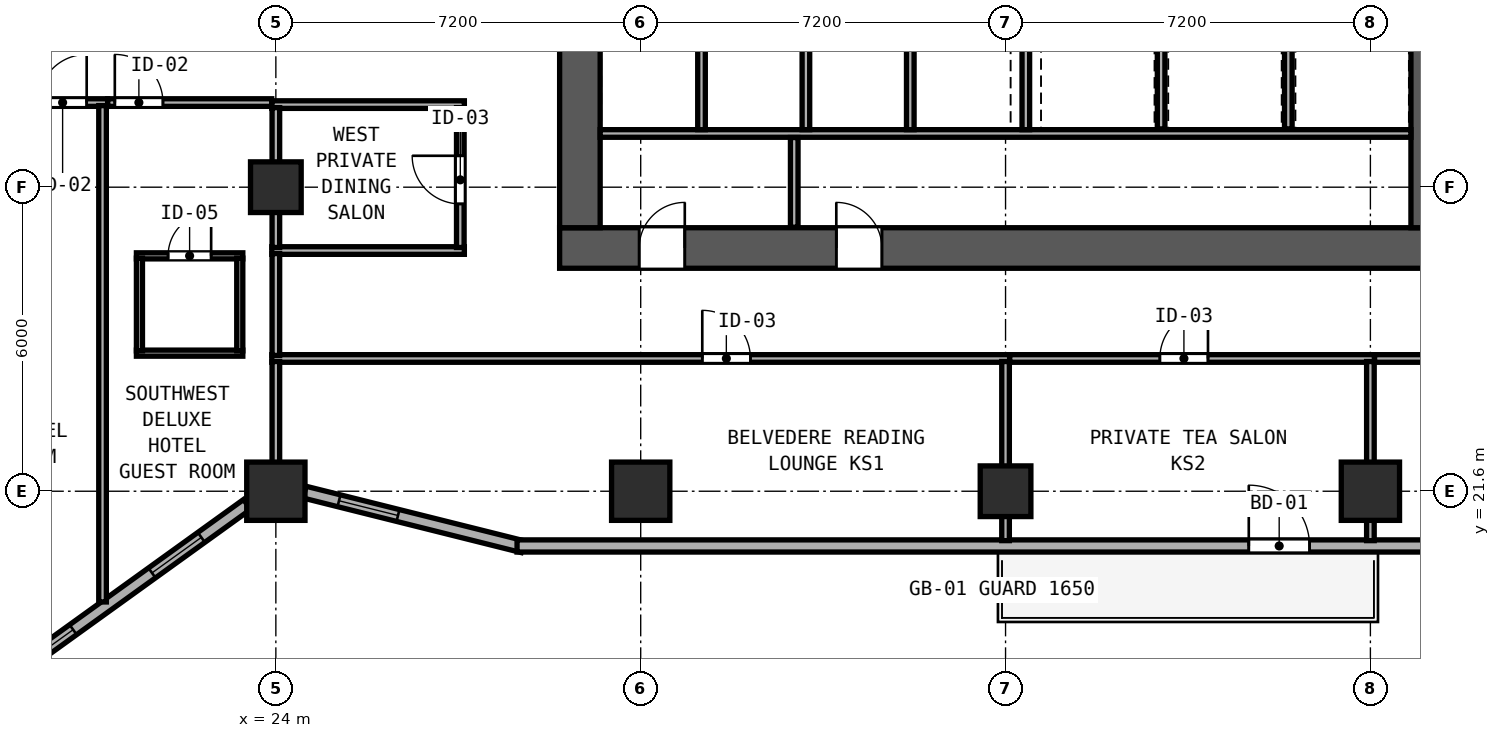
"""IFC4 building model, lengths in metres.
Left out: names, types, materials, properties, quantities, classifications, styles, units other than length and angle.
Written with IfcOpenShell. Run it as: python <this file> out.ifc"""

import sys

from ifc_helpers import new_model, si_unit, direction, frame, frame_2d, origin, origin_2d, place, context, subcontext, project, spatial, rectangle, hollow_rectangle, extrude, element, fill, save


model = new_model("IFC4")
c1 = context("Model", 3, precision=1e-05, world=origin(), true_north=direction((0.0, 1.0)))
c2 = subcontext(c1, "Body", "Model", "MODEL_VIEW")
j1 = project(units=[si_unit("LENGTHUNIT", "METRE"), si_unit("PLANEANGLEUNIT", "RADIAN")], contexts=[c1])
p1 = place(None, origin())
s1 = spatial("IfcSite", under=j1, at=p1, CompositionType="ELEMENT")
p2 = place(p1, origin())
s2 = spatial("IfcBuilding", under=s1, at=p2, CompositionType="ELEMENT")
p3 = place(p2, frame((0.0, 0.0, 59.0)))
s3 = spatial("IfcBuildingStorey", under=s2, at=p3, CompositionType="ELEMENT", Elevation=59.0)
p4 = place(p3, frame((29.6, 26.4, 0.0), z_axis=(0.0, 0.0, 1.0), x_axis=(1.0, 0.0, 0.0)))
e1 = element("IfcWall", 1, at=p4, inside=s3, PredefinedType="SHEAR", context=c2, shape_type="SweptSolid", body=[
    extrude(rectangle(XDim=17.6, YDim=0.8, at=frame_2d((8.8, 0.0))), origin(), (0.0, 0.0, 1.0), 3.6),
])
p5 = place(p4, frame((2.47, 0.0, 0.0), z_axis=(0.0, 0.0, 1.0), x_axis=(-1.0, 0.0, 0.0)))
e2 = element("IfcOpeningElement", 2, at=p5, cuts=e1, PredefinedType="OPENING", context=c2, shape_type="SweptSolid", body=[
    extrude(rectangle(XDim=0.9, YDim=2.1, at=frame_2d((0.45, 1.05))), frame((0.0, 0.41, 0.0), z_axis=(0.0, -1.0, 0.0), x_axis=(1.0, 0.0, 0.0)), (0.0, 0.0, 1.0), 0.82),
])
p6 = place(p4, frame((6.36, 0.0, 0.0), z_axis=(0.0, 0.0, 1.0), x_axis=(-1.0, 0.0, 0.0)))
e3 = element("IfcOpeningElement", 3, at=p6, cuts=e1, PredefinedType="OPENING", context=c2, shape_type="SweptSolid", body=[
    extrude(rectangle(XDim=0.9, YDim=2.1, at=frame_2d((0.45, 1.05))), frame((0.0, 0.41, 0.0), z_axis=(0.0, -1.0, 0.0), x_axis=(1.0, 0.0, 0.0)), (0.0, 0.0, 1.0), 0.82),
])
for number, where, z_axis, x_axis in (
    (4, (30.0, 26.8, 0.0), (0.0, 0.0, 1.0), (0.0, 1.0, 0.0)),
    (5, (46.8, 26.8, 0.0), (0.0, 0.0, 1.0), (0.0, 1.0, 0.0)),
):
    element("IfcWall", number, at=place(p3, frame(where, z_axis=z_axis, x_axis=x_axis)), inside=s3, PredefinedType="SHEAR", context=c2, shape_type="SweptSolid", body=[
        extrude(rectangle(XDim=4.05, YDim=0.8, at=frame_2d((2.025, 0.0))), origin(), (0.0, 0.0, 1.0), 3.6),
    ])
for number, where, z_axis, x_axis in (
    (6, (24.0, 21.6, 0.0), (0.0, 0.0, 1.0), (1.0, 0.0, 0.0)),
    (7, (31.2, 21.6, 0.0), (0.0, 0.0, 1.0), (1.0, 0.0, 0.0)),
    (8, (45.6, 21.6, 0.0), (0.0, 0.0, 1.0), (1.0, 0.0, 0.0)),
):
    element("IfcColumn", number, at=place(p3, frame(where, z_axis=z_axis, x_axis=x_axis)), inside=s3, PredefinedType="COLUMN", context=c2, shape_type="SweptSolid", body=[
        extrude(hollow_rectangle(XDim=1.15, YDim=1.15, WallThickness=0.042, at=origin_2d()), origin(), (0.0, 0.0, 1.0), 3.8),
    ])
for number, where, z_axis, x_axis in (
    (9, (24.0, 27.6, 0.0), (0.0, 0.0, 1.0), (1.0, 0.0, 0.0)),
    (10, (38.4, 21.6, 0.0), (0.0, 0.0, 1.0), (1.0, 0.0, 0.0)),
):
    element("IfcColumn", number, at=place(p3, frame(where, z_axis=z_axis, x_axis=x_axis)), inside=s3, PredefinedType="COLUMN", context=c2, shape_type="SweptSolid", body=[
        extrude(hollow_rectangle(XDim=1.0, YDim=1.0, WallThickness=0.038, at=origin_2d()), origin(), (0.0, 0.0, 1.0), 3.8),
    ])
p7 = place(p3, frame((14.075, 14.602, 0.0), z_axis=(0.0, 0.0, 1.0), x_axis=(0.811543176492, 0.58429245476, 0.0)))
e11 = element("IfcWall", 11, at=p7, inside=s3, PredefinedType="SOLIDWALL", context=c2, shape_type="SweptSolid", body=[
    extrude(rectangle(XDim=11.531, YDim=0.24, at=frame_2d((5.765, 0.0))), origin(), (0.0, 0.0, 1.0), 3.097),
])
p8 = place(p7, frame((0.7, 0.0, 0.85)))
e12 = element("IfcOpeningElement", 12, at=p8, cuts=e11, PredefinedType="OPENING", context=c2, shape_type="SweptSolid", body=[
    extrude(rectangle(XDim=1.2, YDim=1.85, at=frame_2d((0.6, 0.925))), frame((0.0, 0.13, 0.0), z_axis=(0.0, -1.0, 0.0), x_axis=(1.0, 0.0, 0.0)), (0.0, 0.0, 1.0), 0.26),
])
p9 = place(p7, frame((6.1, 0.0, 0.85)))
e13 = element("IfcOpeningElement", 13, at=p9, cuts=e11, PredefinedType="OPENING", context=c2, shape_type="SweptSolid", body=[
    extrude(rectangle(XDim=1.2, YDim=1.85, at=frame_2d((0.6, 0.925))), frame((0.0, 0.13, 0.0), z_axis=(0.0, -1.0, 0.0), x_axis=(1.0, 0.0, 0.0)), (0.0, 0.0, 1.0), 0.26),
])
p10 = place(p7, frame((9.218, 0.0, 0.85)))
e14 = element("IfcOpeningElement", 14, at=p10, cuts=e11, PredefinedType="OPENING", context=c2, shape_type="SweptSolid", body=[
    extrude(rectangle(XDim=1.2, YDim=1.85, at=frame_2d((0.6, 0.925))), frame((0.0, 0.13, 0.0), z_axis=(0.0, -1.0, 0.0), x_axis=(1.0, 0.0, 0.0)), (0.0, 0.0, 1.0), 0.26),
])
p11 = place(p3, frame((24.567, 21.582, 0.0), z_axis=(0.0, 0.0, 1.0), x_axis=(0.970148978127, -0.24250971164, 0.0)))
e15 = element("IfcWall", 15, at=p11, inside=s3, PredefinedType="SOLIDWALL", context=c2, shape_type="SweptSolid", body=[
    extrude(rectangle(XDim=4.434, YDim=0.24, at=frame_2d((2.217, 0.0))), origin(), (0.0, 0.0, 1.0), 3.097),
])
p12 = place(p11, frame((0.7, 0.0, 0.85)))
e16 = element("IfcOpeningElement", 16, at=p12, cuts=e15, PredefinedType="OPENING", context=c2, shape_type="SweptSolid", body=[
    extrude(rectangle(XDim=1.2, YDim=1.85, at=frame_2d((0.6, 0.925))), frame((0.0, 0.13, 0.0), z_axis=(0.0, -1.0, 0.0), x_axis=(1.0, 0.0, 0.0)), (0.0, 0.0, 1.0), 0.26),
])
p13 = place(p3, frame((28.76, 20.52, 0.0), z_axis=(0.0, 0.0, 1.0), x_axis=(1.0, 0.0, 0.0)))
e17 = element("IfcWall", 17, at=p13, inside=s3, PredefinedType="SOLIDWALL", context=c2, shape_type="SweptSolid", body=[
    extrude(rectangle(XDim=19.281, YDim=0.24, at=frame_2d((9.64, 0.0))), origin(), (0.0, 0.0, 1.0), 3.6),
])
p14 = place(p13, frame((15.64, 0.0, 0.0), z_axis=(0.0, 0.0, 1.0), x_axis=(-1.0, 0.0, 0.0)))
e18 = element("IfcOpeningElement", 18, at=p14, cuts=e17, PredefinedType="OPENING", context=c2, shape_type="SweptSolid", body=[
    extrude(rectangle(XDim=1.2, YDim=2.15, at=frame_2d((0.6, 1.075))), frame((0.0, 0.13, 0.0), z_axis=(0.0, -1.0, 0.0), x_axis=(1.0, 0.0, 0.0)), (0.0, 0.0, 1.0), 0.26),
])
p15 = place(p3, frame((30.4, 28.66, 0.0), z_axis=(0.0, 0.0, 1.0), x_axis=(1.0, 0.0, 0.0)))
e19 = element("IfcWall", 19, at=p15, inside=s3, PredefinedType="PARTITIONING", context=c2, shape_type="SweptSolid", body=[
    extrude(rectangle(XDim=16.0, YDim=0.15, at=frame_2d((8.0, 0.0))), origin(), (0.0, 0.0, 1.0), 3.6),
])
for number, where, z_axis, x_axis in (
    (20, (32.4, 28.735, 0.0), (0.0, 0.0, 1.0), (0.0, 1.0, 0.0)),
    (21, (34.46, 28.735, 0.0), (0.0, 0.0, 1.0), (0.0, 1.0, 0.0)),
    (22, (36.52, 28.735, 0.0), (0.0, 0.0, 1.0), (0.0, 1.0, 0.0)),
    (23, (38.8, 28.735, 0.0), (0.0, 0.0, 1.0), (0.0, 1.0, 0.0)),
):
    element("IfcWall", number, at=place(p3, frame(where, z_axis=z_axis, x_axis=x_axis)), inside=s3, PredefinedType="SOLIDWALL", context=c2, shape_type="SweptSolid", body=[
        extrude(rectangle(XDim=1.985, YDim=0.15, at=frame_2d((0.992, 0.0))), origin(), (0.0, 0.0, 1.0), 3.6),
    ])
p16 = place(p3, frame((34.23, 26.81, 0.0), z_axis=(0.0, 0.0, 1.0), x_axis=(0.0, 1.0, 0.0)))
e24 = element("IfcWall", 24, at=p16, inside=s3, PredefinedType="PARTITIONING", context=c2, shape_type="SweptSolid", body=[
    extrude(rectangle(XDim=1.77, YDim=0.15, at=frame_2d((0.885, 0.0))), origin(), (0.0, 0.0, 1.0), 3.6),
])
for number, where, z_axis, x_axis in (
    (25, (41.47, 28.75, 0.0), (0.0, 0.0, 1.0), (0.0, 1.0, 0.0)),
    (26, (43.98, 28.75, 0.0), (0.0, 0.0, 1.0), (0.0, 1.0, 0.0)),
):
    element("IfcWall", number, at=place(p3, frame(where, z_axis=z_axis, x_axis=x_axis)), inside=s3, PredefinedType="SOLIDWALL", context=c2, shape_type="SweptSolid", body=[
        extrude(rectangle(XDim=1.985, YDim=0.15, at=frame_2d((0.993, 0.0))), origin(), (0.0, 0.0, 1.0), 3.6),
    ])
for number, where, z_axis, x_axis in (
    (27, (23.92, 29.23, 0.0), (0.0, 0.0, 1.0), (1.0, 0.0, 0.0)),
    (28, (23.92, 26.35, 0.0), (0.0, 0.0, 1.0), (1.0, 0.0, 0.0)),
):
    element("IfcWall", number, at=place(p3, frame(where, z_axis=z_axis, x_axis=x_axis)), inside=s3, PredefinedType="PARTITIONING", context=c2, shape_type="SweptSolid", body=[
        extrude(rectangle(XDim=3.8, YDim=0.15, at=frame_2d((1.9, 0.0))), origin(), (0.0, 0.0, 1.0), 3.6),
    ])
p17 = place(p3, frame((24.0, 26.41, 0.0), z_axis=(0.0, 0.0, 1.0), x_axis=(0.0, 1.0, 0.0)))
e29 = element("IfcWall", 29, at=p17, inside=s3, PredefinedType="PARTITIONING", context=c2, shape_type="SweptSolid", body=[
    extrude(rectangle(XDim=2.76, YDim=0.15, at=frame_2d((1.38, 0.0))), origin(), (0.0, 0.0, 1.0), 3.097),
])
p18 = place(p3, frame((27.64, 26.41, 0.0), z_axis=(0.0, 0.0, 1.0), x_axis=(0.0, 1.0, 0.0)))
e30 = element("IfcWall", 30, at=p18, inside=s3, PredefinedType="PARTITIONING", context=c2, shape_type="SweptSolid", body=[
    extrude(rectangle(XDim=2.76, YDim=0.15, at=frame_2d((1.38, 0.0))), origin(), (0.0, 0.0, 1.0), 3.6),
])
p19 = place(p18, frame((1.81, 0.0, 0.0), z_axis=(0.0, 0.0, 1.0), x_axis=(-1.0, 0.0, 0.0)))
e31 = element("IfcOpeningElement", 31, at=p19, cuts=e30, PredefinedType="OPENING", context=c2, shape_type="SweptSolid", body=[
    extrude(rectangle(XDim=0.95, YDim=2.12, at=frame_2d((0.475, 1.06))), frame((0.0, 0.085, 0.0), z_axis=(0.0, -1.0, 0.0), x_axis=(1.0, 0.0, 0.0)), (0.0, 0.0, 1.0), 0.17),
])
p20 = place(p3, frame((23.92, 24.22, 0.0), z_axis=(0.0, 0.0, 1.0), x_axis=(1.0, 0.0, 0.0)))
e32 = element("IfcWall", 32, at=p20, inside=s3, PredefinedType="PARTITIONING", context=c2, shape_type="SweptSolid", body=[
    extrude(rectangle(XDim=14.56, YDim=0.15, at=frame_2d((7.28, 0.0))), origin(), (0.0, 0.0, 1.0), 3.6),
])
p21 = place(p20, frame((9.445, 0.0, 0.0), z_axis=(0.0, 0.0, 1.0), x_axis=(-1.0, 0.0, 0.0)))
e33 = element("IfcOpeningElement", 33, at=p21, cuts=e32, PredefinedType="OPENING", context=c2, shape_type="SweptSolid", body=[
    extrude(rectangle(XDim=0.95, YDim=2.12, at=frame_2d((0.475, 1.06))), frame((0.0, 0.085, 0.0), z_axis=(0.0, -1.0, 0.0), x_axis=(1.0, 0.0, 0.0)), (0.0, 0.0, 1.0), 0.17),
])
p22 = place(p3, frame((24.0, 21.819, 0.0), z_axis=(0.0, 0.0, 1.0), x_axis=(0.0, 1.0, 0.0)))
e34 = element("IfcWall", 34, at=p22, inside=s3, PredefinedType="PARTITIONING", context=c2, shape_type="SweptSolid", body=[
    extrude(rectangle(XDim=2.341, YDim=0.15, at=frame_2d((1.171, 0.0))), origin(), (0.0, 0.0, 1.0), 3.097),
])
p23 = place(p3, frame((38.4, 20.625, 0.0), z_axis=(0.0, 0.0, 1.0), x_axis=(0.0, 1.0, 0.0)))
e35 = element("IfcWall", 35, at=p23, inside=s3, PredefinedType="PARTITIONING", context=c2, shape_type="SweptSolid", body=[
    extrude(rectangle(XDim=3.535, YDim=0.15, at=frame_2d((1.768, 0.0))), origin(), (0.0, 0.0, 1.0), 2.985),
])
p24 = place(p3, frame((38.482, 24.22, 0.0), z_axis=(0.0, 0.0, 1.0), x_axis=(1.0, 0.0, 0.0)))
e36 = element("IfcWall", 36, at=p24, inside=s3, PredefinedType="PARTITIONING", context=c2, shape_type="SweptSolid", body=[
    extrude(rectangle(XDim=7.198, YDim=0.15, at=frame_2d((3.599, 0.0))), origin(), (0.0, 0.0, 1.0), 3.6),
])
p25 = place(p24, frame((3.913, 0.0, 0.0), z_axis=(0.0, 0.0, 1.0), x_axis=(-1.0, 0.0, 0.0)))
e37 = element("IfcOpeningElement", 37, at=p25, cuts=e36, PredefinedType="OPENING", context=c2, shape_type="SweptSolid", body=[
    extrude(rectangle(XDim=0.95, YDim=2.12, at=frame_2d((0.475, 1.06))), frame((0.0, 0.085, 0.0), z_axis=(0.0, -1.0, 0.0), x_axis=(1.0, 0.0, 0.0)), (0.0, 0.0, 1.0), 0.17),
])
p26 = place(p3, frame((45.6, 20.625, 0.0), z_axis=(0.0, 0.0, 1.0), x_axis=(0.0, 1.0, 0.0)))
e38 = element("IfcWall", 38, at=p26, inside=s3, PredefinedType="PARTITIONING", context=c2, shape_type="SweptSolid", body=[
    extrude(rectangle(XDim=3.535, YDim=0.15, at=frame_2d((1.768, 0.0))), origin(), (0.0, 0.0, 1.0), 2.985),
])
p27 = place(p3, frame((45.682, 24.22, 0.0), z_axis=(0.0, 0.0, 1.0), x_axis=(1.0, 0.0, 0.0)))
e39 = element("IfcWall", 39, at=p27, inside=s3, PredefinedType="PARTITIONING", context=c2, shape_type="SweptSolid", body=[
    extrude(rectangle(XDim=7.198, YDim=0.15, at=frame_2d((3.599, 0.0))), origin(), (0.0, 0.0, 1.0), 3.6),
])
p28 = place(p27, frame((2.143, 0.0, 0.0), z_axis=(0.0, 0.0, 1.0), x_axis=(-1.0, 0.0, 0.0)))
e40 = element("IfcOpeningElement", 40, at=p28, cuts=e39, PredefinedType="OPENING", context=c2, shape_type="SweptSolid", body=[
    extrude(rectangle(XDim=0.95, YDim=2.12, at=frame_2d((0.475, 1.06))), frame((0.0, 0.085, 0.0), z_axis=(0.0, -1.0, 0.0), x_axis=(1.0, 0.0, 0.0)), (0.0, 0.0, 1.0), 0.17),
])
p29 = place(p3, frame((16.542, 29.27, 0.0), z_axis=(0.0, 0.0, 1.0), x_axis=(1.0, 0.0, 0.0)))
e41 = element("IfcWall", 41, at=p29, inside=s3, PredefinedType="PARTITIONING", context=c2, shape_type="SweptSolid", body=[
    extrude(rectangle(XDim=4.138, YDim=0.15, at=frame_2d((2.069, 0.0))), origin(), (0.0, 0.0, 1.0), 3.6),
])
p30 = place(p29, frame((3.725, 0.0, 0.0), z_axis=(0.0, 0.0, 1.0), x_axis=(-1.0, 0.0, 0.0)))
e42 = element("IfcOpeningElement", 42, at=p30, cuts=e41, PredefinedType="OPENING", context=c2, shape_type="SweptSolid", body=[
    extrude(rectangle(XDim=0.95, YDim=2.15, at=frame_2d((0.475, 1.075))), frame((0.0, 0.085, 0.0), z_axis=(0.0, -1.0, 0.0), x_axis=(1.0, 0.0, 0.0)), (0.0, 0.0, 1.0), 0.17),
])
p31 = place(p3, frame((20.58, 19.415, 0.0), z_axis=(0.0, 0.0, 1.0), x_axis=(0.0, 1.0, 0.0)))
e43 = element("IfcWall", 43, at=p31, inside=s3, PredefinedType="PARTITIONING", context=c2, shape_type="SweptSolid", body=[
    extrude(rectangle(XDim=9.795, YDim=0.15, at=frame_2d((4.897, 0.0))), origin(), (0.0, 0.0, 1.0), 3.6),
])
p32 = place(p3, frame((20.682, 29.27, 0.0), z_axis=(0.0, 0.0, 1.0), x_axis=(1.0, 0.0, 0.0)))
e44 = element("IfcWall", 44, at=p32, inside=s3, PredefinedType="PARTITIONING", context=c2, shape_type="SweptSolid", body=[
    extrude(rectangle(XDim=3.236, YDim=0.15, at=frame_2d((1.618, 0.0))), origin(), (0.0, 0.0, 1.0), 3.6),
])
p33 = place(p32, frame((1.09, 0.0, 0.0), z_axis=(0.0, 0.0, 1.0), x_axis=(-1.0, 0.0, 0.0)))
e45 = element("IfcOpeningElement", 45, at=p33, cuts=e44, PredefinedType="OPENING", context=c2, shape_type="SweptSolid", body=[
    extrude(rectangle(XDim=0.95, YDim=2.15, at=frame_2d((0.475, 1.075))), frame((0.0, 0.085, 0.0), z_axis=(0.0, -1.0, 0.0), x_axis=(1.0, 0.0, 0.0)), (0.0, 0.0, 1.0), 0.17),
])
p34 = place(p3, frame((24.0, 24.28, 0.0), z_axis=(0.0, 0.0, 1.0), x_axis=(0.0, 1.0, 0.0)))
e46 = element("IfcWall", 46, at=p34, inside=s3, PredefinedType="PARTITIONING", context=c2, shape_type="SweptSolid", body=[
    extrude(rectangle(XDim=2.01, YDim=0.15, at=frame_2d((1.005, 0.0))), origin(), (0.0, 0.0, 1.0), 3.097),
])
p35 = place(p3, frame((21.248, 26.245, 0.0), z_axis=(0.0, 0.0, 1.0), x_axis=(1.0, 0.0, 0.0)))
e47 = element("IfcWall", 47, at=p35, inside=s3, PredefinedType="PARTITIONING", context=c2, shape_type="SweptSolid", body=[
    extrude(rectangle(XDim=2.1, YDim=0.12, at=frame_2d((1.05, 0.0))), origin(), (0.0, 0.0, 1.0), 3.6),
])
p36 = place(p35, frame((1.475, 0.0, 0.0), z_axis=(0.0, 0.0, 1.0), x_axis=(-1.0, 0.0, 0.0)))
e48 = element("IfcOpeningElement", 48, at=p36, cuts=e47, PredefinedType="OPENING", context=c2, shape_type="SweptSolid", body=[
    extrude(rectangle(XDim=0.85, YDim=2.1, at=frame_2d((0.425, 1.05))), frame((0.0, 0.07, 0.0), z_axis=(0.0, -1.0, 0.0), x_axis=(1.0, 0.0, 0.0)), (0.0, 0.0, 1.0), 0.14),
])
p37 = place(p3, frame((21.248, 24.325, 0.0), z_axis=(0.0, 0.0, 1.0), x_axis=(1.0, 0.0, 0.0)))
e49 = element("IfcWall", 49, at=p37, inside=s3, PredefinedType="PARTITIONING", context=c2, shape_type="SweptSolid", body=[
    extrude(rectangle(XDim=2.1, YDim=0.12, at=frame_2d((1.05, 0.0))), origin(), (0.0, 0.0, 1.0), 3.6),
])
for number, where, z_axis, x_axis in (
    (50, (21.308, 24.37, 0.0), (0.0, 0.0, 1.0), (0.0, 1.0, 0.0)),
    (51, (23.288, 24.37, 0.0), (0.0, 0.0, 1.0), (0.0, 1.0, 0.0)),
):
    element("IfcWall", number, at=place(p3, frame(where, z_axis=z_axis, x_axis=x_axis)), inside=s3, PredefinedType="PARTITIONING", context=c2, shape_type="SweptSolid", body=[
        extrude(rectangle(XDim=1.83, YDim=0.12, at=frame_2d((0.915, 0.0))), origin(), (0.0, 0.0, 1.0), 3.6),
    ])
p38 = place(p9, origin())
e52 = element("IfcWindow", 52, at=p38, inside=s3, PartitioningType="SINGLE_PANEL", PredefinedType="WINDOW", context=c2, shape_type="SweptSolid", body=[
    extrude(rectangle(XDim=1.2, YDim=1.85, at=frame_2d((0.6, 0.925))), frame((0.0, 0.03, 0.0), z_axis=(0.0, -1.0, 0.0), x_axis=(1.0, 0.0, 0.0)), (0.0, 0.0, 1.0), 0.06),
])
fill(e13, e52)
p39 = place(p12, origin())
e53 = element("IfcWindow", 53, at=p39, inside=s3, PartitioningType="SINGLE_PANEL", PredefinedType="WINDOW", context=c2, shape_type="SweptSolid", body=[
    extrude(rectangle(XDim=1.2, YDim=1.85, at=frame_2d((0.6, 0.925))), frame((0.0, 0.03, 0.0), z_axis=(0.0, -1.0, 0.0), x_axis=(1.0, 0.0, 0.0)), (0.0, 0.0, 1.0), 0.06),
])
fill(e16, e53)
p40 = place(p14, origin())
e54 = element("IfcDoor", 54, at=p40, inside=s3, OperationType="SINGLE_SWING_RIGHT", PredefinedType="DOOR", context=c2, shape_type="SweptSolid", body=[
    extrude(rectangle(XDim=1.2, YDim=2.15, at=frame_2d((0.6, 1.075))), frame((0.0, 0.025, 0.0), z_axis=(0.0, -1.0, 0.0), x_axis=(1.0, 0.0, 0.0)), (0.0, 0.0, 1.0), 0.05),
])
fill(e18, e54)
p41 = place(p5, origin())
e55 = element("IfcDoor", 55, at=p41, inside=s3, OperationType="SINGLE_SWING_LEFT", PredefinedType="DOOR", context=c2, shape_type="SweptSolid", body=[
    extrude(rectangle(XDim=0.9, YDim=2.1, at=frame_2d((0.45, 1.05))), frame((0.0, -0.195, 0.0), z_axis=(0.0, -1.0, 0.0), x_axis=(1.0, 0.0, 0.0)), (0.0, 0.0, 1.0), 0.05),
])
fill(e2, e55)
p42 = place(p6, origin())
e56 = element("IfcDoor", 56, at=p42, inside=s3, OperationType="SINGLE_SWING_RIGHT", PredefinedType="DOOR", context=c2, shape_type="SweptSolid", body=[
    extrude(rectangle(XDim=0.9, YDim=2.1, at=frame_2d((0.45, 1.05))), frame((0.0, -0.195, 0.0), z_axis=(0.0, -1.0, 0.0), x_axis=(1.0, 0.0, 0.0)), (0.0, 0.0, 1.0), 0.05),
])
fill(e3, e56)
p43 = place(p19, origin())
e57 = element("IfcDoor", 57, at=p43, inside=s3, OperationType="SINGLE_SWING_LEFT", PredefinedType="DOOR", context=c2, shape_type="SweptSolid", body=[
    extrude(rectangle(XDim=0.95, YDim=2.12, at=frame_2d((0.475, 1.06))), frame((0.0, 0.025, 0.0), z_axis=(0.0, -1.0, 0.0), x_axis=(1.0, 0.0, 0.0)), (0.0, 0.0, 1.0), 0.05),
])
fill(e31, e57)
p44 = place(p21, origin())
e58 = element("IfcDoor", 58, at=p44, inside=s3, OperationType="SINGLE_SWING_RIGHT", PredefinedType="DOOR", context=c2, shape_type="SweptSolid", body=[
    extrude(rectangle(XDim=0.95, YDim=2.12, at=frame_2d((0.475, 1.06))), frame((0.0, 0.025, 0.0), z_axis=(0.0, -1.0, 0.0), x_axis=(1.0, 0.0, 0.0)), (0.0, 0.0, 1.0), 0.05),
])
fill(e33, e58)
p45 = place(p25, origin())
e59 = element("IfcDoor", 59, at=p45, inside=s3, OperationType="SINGLE_SWING_LEFT", PredefinedType="DOOR", context=c2, shape_type="SweptSolid", body=[
    extrude(rectangle(XDim=0.95, YDim=2.12, at=frame_2d((0.475, 1.06))), frame((0.0, 0.025, 0.0), z_axis=(0.0, -1.0, 0.0), x_axis=(1.0, 0.0, 0.0)), (0.0, 0.0, 1.0), 0.05),
])
fill(e37, e59)
p46 = place(p30, origin())
e60 = element("IfcDoor", 60, at=p46, inside=s3, OperationType="SINGLE_SWING_LEFT", PredefinedType="DOOR", context=c2, shape_type="SweptSolid", body=[
    extrude(rectangle(XDim=0.95, YDim=2.15, at=frame_2d((0.475, 1.075))), frame((0.0, 0.025, 0.0), z_axis=(0.0, -1.0, 0.0), x_axis=(1.0, 0.0, 0.0)), (0.0, 0.0, 1.0), 0.05),
])
fill(e42, e60)
p47 = place(p33, origin())
e61 = element("IfcDoor", 61, at=p47, inside=s3, OperationType="SINGLE_SWING_RIGHT", PredefinedType="DOOR", context=c2, shape_type="SweptSolid", body=[
    extrude(rectangle(XDim=0.95, YDim=2.15, at=frame_2d((0.475, 1.075))), frame((0.0, 0.025, 0.0), z_axis=(0.0, -1.0, 0.0), x_axis=(1.0, 0.0, 0.0)), (0.0, 0.0, 1.0), 0.05),
])
fill(e45, e61)
p48 = place(p36, origin())
e62 = element("IfcDoor", 62, at=p48, inside=s3, OperationType="SINGLE_SWING_LEFT", PredefinedType="DOOR", context=c2, shape_type="SweptSolid", body=[
    extrude(rectangle(XDim=0.85, YDim=2.1, at=frame_2d((0.425, 1.05))), frame((0.0, 0.025, 0.0), z_axis=(0.0, -1.0, 0.0), x_axis=(1.0, 0.0, 0.0)), (0.0, 0.0, 1.0), 0.05),
])
fill(e48, e62)
p49 = place(p10, origin())
e63 = element("IfcWindow", 63, at=p49, inside=s3, PartitioningType="SINGLE_PANEL", PredefinedType="WINDOW", context=c2, shape_type="SweptSolid", body=[
    extrude(rectangle(XDim=1.2, YDim=1.85, at=frame_2d((0.6, 0.925))), frame((0.0, 0.03, 0.0), z_axis=(0.0, -1.0, 0.0), x_axis=(1.0, 0.0, 0.0)), (0.0, 0.0, 1.0), 0.06),
])
fill(e14, e63)
save(model, sys.argv[1])
